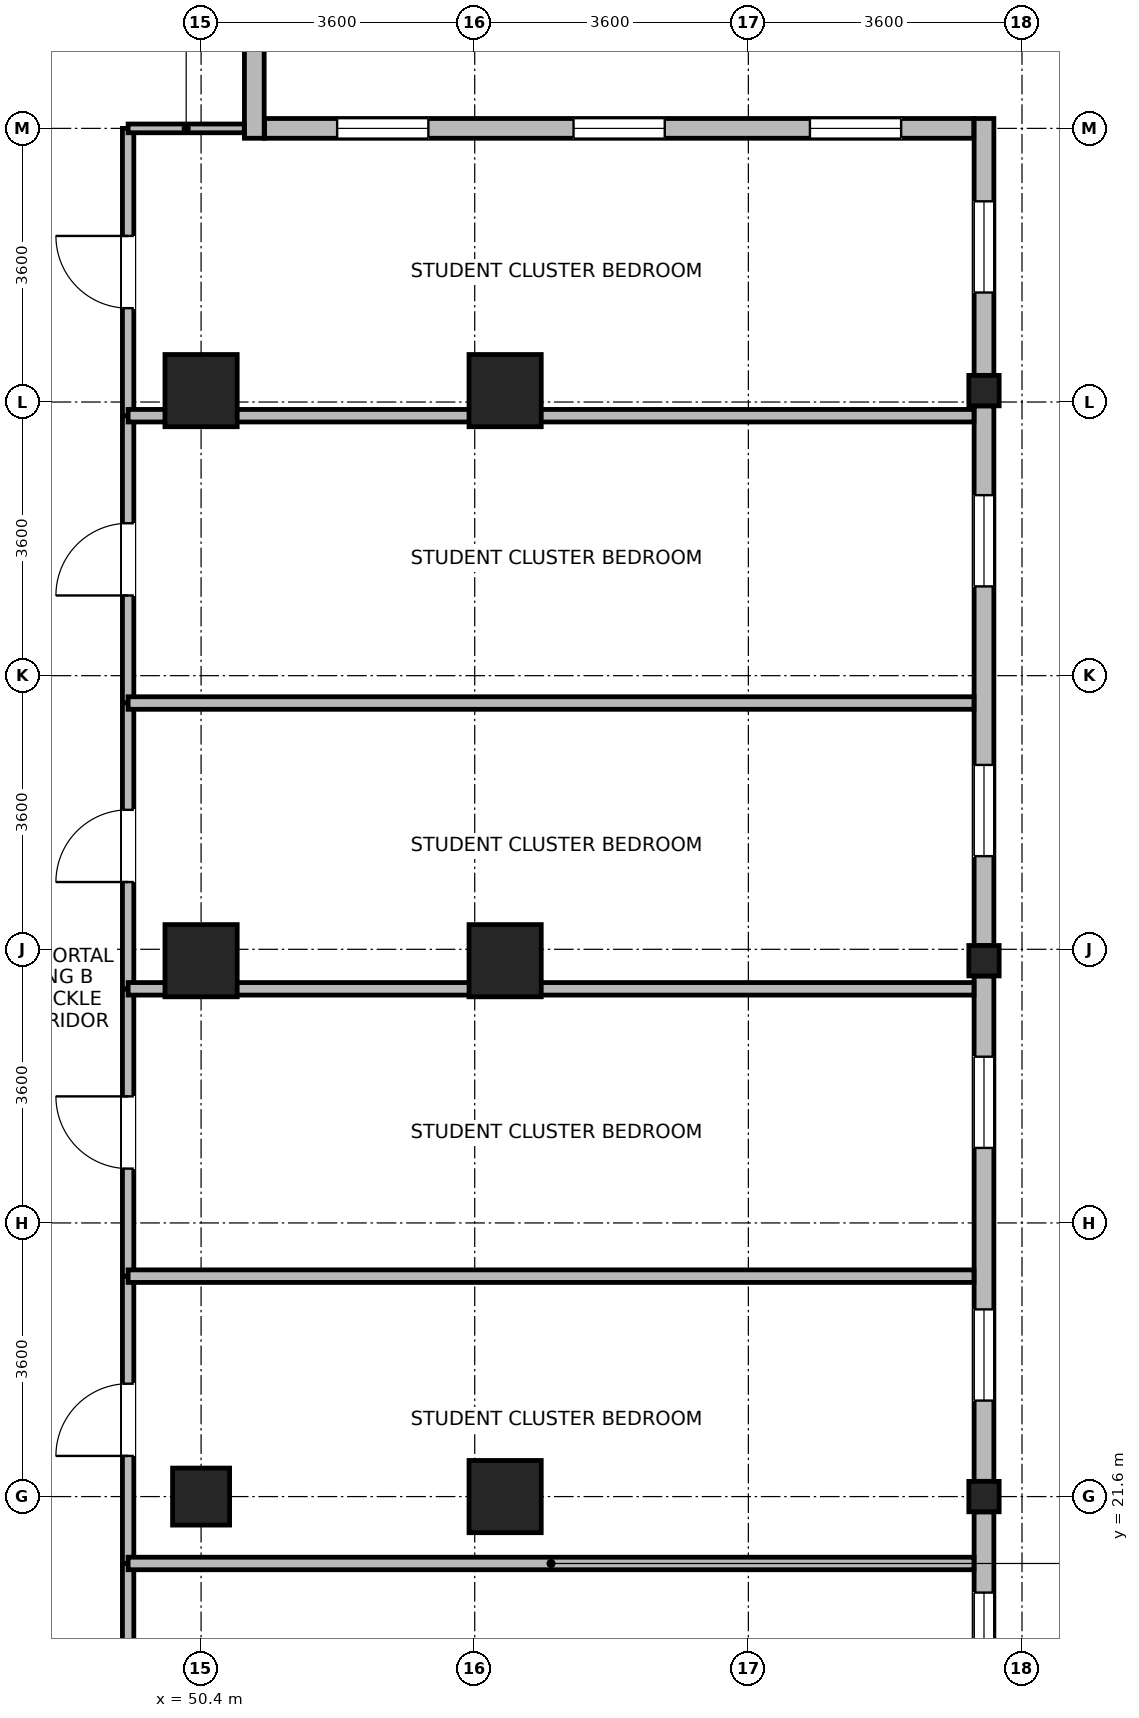
"""IFC4 building model, lengths in metres.
Left out: names, types, materials, properties, quantities, classifications, styles, units other than length and angle.
Written with IfcOpenShell. Run it as: python <this file> out.ifc"""

import sys

from ifc_helpers import new_model, si_unit, direction, frame, frame_2d, origin, origin_2d, place, context, subcontext, project, spatial, rectangle, i_section, extrude, source, transform, mapped, element, fill, save


model = new_model("IFC4")
c1 = context("Model", 3, precision=1e-05, world=origin(), true_north=direction((0.0, 1.0)))
c2 = subcontext(c1, "Body", "Model", "MODEL_VIEW")
j1 = project(units=[si_unit("LENGTHUNIT", "METRE"), si_unit("PLANEANGLEUNIT", "RADIAN")], contexts=[c1])
p1 = place(None, origin())
s1 = spatial("IfcSite", under=j1, at=p1, CompositionType="ELEMENT")
p2 = place(p1, origin())
s2 = spatial("IfcBuilding", under=s1, at=p2, CompositionType="ELEMENT")
p3 = place(p2, frame((0.0, 0.0, 246.2)))
s3 = spatial("IfcBuildingStorey", under=s2, at=p3, CompositionType="ELEMENT", Elevation=246.2)
m1 = source(origin(), c2, "Body", "SweptSolid", [
    extrude(rectangle(XDim=0.75, YDim=0.75, at=origin_2d()), origin(), (0.0, 0.0, 1.0), 3.7),
])
p4 = place(p3, frame((50.4, 21.6, 0.0), z_axis=(0.0, 0.0, 1.0), x_axis=(1.0, 0.0, 0.0)))
e1 = element("IfcColumn", 1, at=p4, inside=s3, PredefinedType="PILASTER", context=c2, shape_type="MappedRepresentation", body=[
    mapped(m1, transform((0.0, 0.0, 0.0), x_axis=(1.0, 0.0, 0.0), y_axis=(0.0, 1.0, 0.0), z_axis=(0.0, 0.0, 1.0), scale=1.0)),
])
m2 = source(origin(), c2, "Body", "SweptSolid", [
    extrude(rectangle(XDim=0.95, YDim=0.95, at=origin_2d()), origin(), (0.0, 0.0, 1.0), 3.7),
])
for number, where, z_axis, x_axis in (
    (2, (50.4, 28.65, 0.0), (0.0, 0.0, 1.0), (1.0, 0.0, 0.0)),
    (3, (50.4, 36.15, 0.0), (0.0, 0.0, 1.0), (1.0, 0.0, 0.0)),
    (4, (54.4, 21.6, 0.0), (0.0, 0.0, 1.0), (1.0, 0.0, 0.0)),
    (5, (54.4, 28.65, 0.0), (0.0, 0.0, 1.0), (1.0, 0.0, 0.0)),
    (6, (54.4, 36.15, 0.0), (0.0, 0.0, 1.0), (1.0, 0.0, 0.0)),
):
    element("IfcColumn", number, at=place(p3, frame(where, z_axis=z_axis, x_axis=x_axis)), inside=s3, PredefinedType="COLUMN", context=c2, shape_type="MappedRepresentation", body=[
        mapped(m2, transform((0.0, 0.0, 0.0), x_axis=(1.0, 0.0, 0.0), y_axis=(0.0, 1.0, 0.0), z_axis=(0.0, 0.0, 1.0), scale=1.0)),
    ])
m3 = source(origin(), c2, "Body", "SweptSolid", [
    extrude(i_section(OverallWidth=0.399, OverallDepth=0.4, WebThickness=0.017, FlangeThickness=0.023, FilletRadius=0.015, at=origin_2d()), origin(), (0.0, 0.0, 1.0), 3.7),
])
for number, where, z_axis, x_axis in (
    (7, (60.7, 21.6, 0.0), (0.0, 0.0, 1.0), (1.0, 0.0, 0.0)),
    (8, (60.7, 28.65, 0.0), (0.0, 0.0, 1.0), (1.0, 0.0, 0.0)),
    (9, (60.7, 36.15, 0.0), (0.0, 0.0, 1.0), (1.0, 0.0, 0.0)),
):
    element("IfcColumn", number, at=place(p3, frame(where, z_axis=z_axis, x_axis=x_axis)), inside=s3, PredefinedType="COLUMN", context=c2, shape_type="MappedRepresentation", body=[
        mapped(m3, transform((0.0, 0.0, 0.0), x_axis=(1.0, 0.0, 0.0), y_axis=(0.0, 1.0, 0.0), z_axis=(0.0, 0.0, 1.0), scale=1.0)),
    ])
p5 = place(p3, frame((60.7, 21.399, 0.0), z_axis=(0.0, 0.0, 1.0), x_axis=(0.0, -1.0, 0.0)))
e10 = element("IfcWall", 10, at=p5, inside=s3, PredefinedType="STANDARD", context=c2, shape_type="SweptSolid", body=[
    extrude(rectangle(XDim=6.648, YDim=0.26, at=frame_2d((3.324, 0.0))), origin(), (0.0, 0.0, 1.0), 2.86),
])
p6 = place(p5, frame((1.062, 0.0, 0.85)))
e11 = element("IfcOpeningElement", 11, at=p6, cuts=e10, PredefinedType="OPENING", context=c2, shape_type="SweptSolid", body=[
    extrude(rectangle(XDim=1.2, YDim=1.75, at=frame_2d((0.6, 0.875))), frame((0.0, 0.14, 0.0), z_axis=(0.0, -1.0, 0.0), x_axis=(1.0, 0.0, 0.0)), (0.0, 0.0, 1.0), 0.28),
])
p7 = place(p5, frame((2.849, 0.0, 0.85)))
e12 = element("IfcOpeningElement", 12, at=p7, cuts=e10, PredefinedType="OPENING", context=c2, shape_type="SweptSolid", body=[
    extrude(rectangle(XDim=0.95, YDim=1.75, at=frame_2d((0.475, 0.875))), frame((0.0, 0.14, 0.0), z_axis=(0.0, -1.0, 0.0), x_axis=(1.0, 0.0, 0.0)), (0.0, 0.0, 1.0), 0.28),
])
p8 = place(p3, frame((60.7, 28.449, 0.0), z_axis=(0.0, 0.0, 1.0), x_axis=(0.0, -1.0, 0.0)))
e13 = element("IfcWall", 13, at=p8, inside=s3, PredefinedType="STANDARD", context=c2, shape_type="SweptSolid", body=[
    extrude(rectangle(XDim=6.648, YDim=0.26, at=frame_2d((3.324, 0.0))), origin(), (0.0, 0.0, 1.0), 2.86),
])
p9 = place(p8, frame((1.062, 0.0, 0.85)))
e14 = element("IfcOpeningElement", 14, at=p9, cuts=e13, PredefinedType="OPENING", context=c2, shape_type="SweptSolid", body=[
    extrude(rectangle(XDim=1.2, YDim=1.75, at=frame_2d((0.6, 0.875))), frame((0.0, 0.14, 0.0), z_axis=(0.0, -1.0, 0.0), x_axis=(1.0, 0.0, 0.0)), (0.0, 0.0, 1.0), 0.28),
])
p10 = place(p8, frame((4.386, 0.0, 0.85)))
e15 = element("IfcOpeningElement", 15, at=p10, cuts=e13, PredefinedType="OPENING", context=c2, shape_type="SweptSolid", body=[
    extrude(rectangle(XDim=1.2, YDim=1.75, at=frame_2d((0.6, 0.875))), frame((0.0, 0.14, 0.0), z_axis=(0.0, -1.0, 0.0), x_axis=(1.0, 0.0, 0.0)), (0.0, 0.0, 1.0), 0.28),
])
p11 = place(p3, frame((60.7, 35.949, 0.0), z_axis=(0.0, 0.0, 1.0), x_axis=(0.0, -1.0, 0.0)))
e16 = element("IfcWall", 16, at=p11, inside=s3, PredefinedType="STANDARD", context=c2, shape_type="SweptSolid", body=[
    extrude(rectangle(XDim=7.098, YDim=0.26, at=frame_2d((3.549, 0.0))), origin(), (0.0, 0.0, 1.0), 2.86),
])
p12 = place(p11, frame((1.175, 0.0, 0.85)))
e17 = element("IfcOpeningElement", 17, at=p12, cuts=e16, PredefinedType="OPENING", context=c2, shape_type="SweptSolid", body=[
    extrude(rectangle(XDim=1.2, YDim=1.75, at=frame_2d((0.6, 0.875))), frame((0.0, 0.14, 0.0), z_axis=(0.0, -1.0, 0.0), x_axis=(1.0, 0.0, 0.0)), (0.0, 0.0, 1.0), 0.28),
])
p13 = place(p11, frame((4.723, 0.0, 0.85)))
e18 = element("IfcOpeningElement", 18, at=p13, cuts=e16, PredefinedType="OPENING", context=c2, shape_type="SweptSolid", body=[
    extrude(rectangle(XDim=1.2, YDim=1.75, at=frame_2d((0.6, 0.875))), frame((0.0, 0.14, 0.0), z_axis=(0.0, -1.0, 0.0), x_axis=(1.0, 0.0, 0.0)), (0.0, 0.0, 1.0), 0.28),
])
p14 = place(p3, frame((60.7, 39.73, 0.0), z_axis=(0.0, 0.0, 1.0), x_axis=(0.0, -1.0, 0.0)))
e19 = element("IfcWall", 19, at=p14, inside=s3, PredefinedType="STANDARD", context=c2, shape_type="SweptSolid", body=[
    extrude(rectangle(XDim=3.379, YDim=0.26, at=frame_2d((1.689, 0.0))), origin(), (0.0, 0.0, 1.0), 3.26),
])
p15 = place(p14, frame((1.09, 0.0, 0.85)))
e20 = element("IfcOpeningElement", 20, at=p15, cuts=e19, PredefinedType="OPENING", context=c2, shape_type="SweptSolid", body=[
    extrude(rectangle(XDim=1.2, YDim=1.75, at=frame_2d((0.6, 0.875))), frame((0.0, 0.14, 0.0), z_axis=(0.0, -1.0, 0.0), x_axis=(1.0, 0.0, 0.0)), (0.0, 0.0, 1.0), 0.28),
])
p16 = place(p3, frame((51.235, 39.6, 0.0), z_axis=(0.0, 0.0, 1.0), x_axis=(1.0, 0.0, 0.0)))
e21 = element("IfcWall", 21, at=p16, inside=s3, PredefinedType="STANDARD", context=c2, shape_type="SweptSolid", body=[
    extrude(rectangle(XDim=9.33, YDim=0.26, at=frame_2d((4.665, 0.0))), origin(), (0.0, 0.0, 1.0), 3.26),
])
p17 = place(p16, frame((0.955, 0.0, 0.85)))
e22 = element("IfcOpeningElement", 22, at=p17, cuts=e21, PredefinedType="OPENING", context=c2, shape_type="SweptSolid", body=[
    extrude(rectangle(XDim=1.2, YDim=1.75, at=frame_2d((0.6, 0.875))), frame((0.0, 0.14, 0.0), z_axis=(0.0, -1.0, 0.0), x_axis=(1.0, 0.0, 0.0)), (0.0, 0.0, 1.0), 0.28),
])
p18 = place(p16, frame((4.065, 0.0, 0.85)))
e23 = element("IfcOpeningElement", 23, at=p18, cuts=e21, PredefinedType="OPENING", context=c2, shape_type="SweptSolid", body=[
    extrude(rectangle(XDim=1.2, YDim=1.75, at=frame_2d((0.6, 0.875))), frame((0.0, 0.14, 0.0), z_axis=(0.0, -1.0, 0.0), x_axis=(1.0, 0.0, 0.0)), (0.0, 0.0, 1.0), 0.28),
])
p19 = place(p16, frame((7.175, 0.0, 0.85)))
e24 = element("IfcOpeningElement", 24, at=p19, cuts=e21, PredefinedType="OPENING", context=c2, shape_type="SweptSolid", body=[
    extrude(rectangle(XDim=1.2, YDim=1.75, at=frame_2d((0.6, 0.875))), frame((0.0, 0.14, 0.0), z_axis=(0.0, -1.0, 0.0), x_axis=(1.0, 0.0, 0.0)), (0.0, 0.0, 1.0), 0.28),
])
p20 = place(p3, frame((51.1, 43.33, 0.0), z_axis=(0.0, 0.0, 1.0), x_axis=(0.0, -1.0, 0.0)))
e25 = element("IfcWall", 25, at=p20, inside=s3, PredefinedType="STANDARD", context=c2, shape_type="SweptSolid", body=[
    extrude(rectangle(XDim=3.86, YDim=0.26, at=frame_2d((1.93, 0.0))), origin(), (0.0, 0.0, 1.0), 3.26),
])
p21 = place(p20, frame((1.33, 0.0, 0.85)))
e26 = element("IfcOpeningElement", 26, at=p21, cuts=e25, PredefinedType="OPENING", context=c2, shape_type="SweptSolid", body=[
    extrude(rectangle(XDim=1.2, YDim=1.75, at=frame_2d((0.6, 0.875))), frame((0.0, 0.14, 0.0), z_axis=(0.0, -1.0, 0.0), x_axis=(1.0, 0.0, 0.0)), (0.0, 0.0, 1.0), 0.28),
])
p22 = place(p3, frame((49.44, 20.72, 0.0), z_axis=(0.0, 0.0, 1.0), x_axis=(0.0, 1.0, 0.0)))
e27 = element("IfcWall", 27, at=p22, inside=s3, PredefinedType="PARTITIONING", context=c2, shape_type="SweptSolid", body=[
    extrude(rectangle(XDim=3.78, YDim=0.15, at=frame_2d((1.89, 0.0))), origin(), (0.0, 0.0, 1.0), 3.26),
])
p23 = place(p22, frame((1.415, 0.0, 0.0)))
e28 = element("IfcOpeningElement", 28, at=p23, cuts=e27, PredefinedType="OPENING", context=c2, shape_type="SweptSolid", body=[
    extrude(rectangle(XDim=0.95, YDim=2.1, at=frame_2d((0.475, 1.05))), frame((0.0, 0.085, 0.0), z_axis=(0.0, -1.0, 0.0), x_axis=(1.0, 0.0, 0.0)), (0.0, 0.0, 1.0), 0.17),
])
p24 = place(p3, frame((49.44, 24.5, 0.0), z_axis=(0.0, 0.0, 1.0), x_axis=(0.0, 1.0, 0.0)))
e29 = element("IfcWall", 29, at=p24, inside=s3, PredefinedType="PARTITIONING", context=c2, shape_type="SweptSolid", body=[
    extrude(rectangle(XDim=3.78, YDim=0.15, at=frame_2d((1.89, 0.0))), origin(), (0.0, 0.0, 1.0), 3.26),
])
p25 = place(p24, frame((1.415, 0.0, 0.0)))
e30 = element("IfcOpeningElement", 30, at=p25, cuts=e29, PredefinedType="OPENING", context=c2, shape_type="SweptSolid", body=[
    extrude(rectangle(XDim=0.95, YDim=2.1, at=frame_2d((0.475, 1.05))), frame((0.0, 0.085, 0.0), z_axis=(0.0, -1.0, 0.0), x_axis=(1.0, 0.0, 0.0)), (0.0, 0.0, 1.0), 0.17),
])
p26 = place(p3, frame((49.44, 32.04, 0.0), z_axis=(0.0, 0.0, 1.0), x_axis=(0.0, 1.0, 0.0)))
e31 = element("IfcWall", 31, at=p26, inside=s3, PredefinedType="PARTITIONING", context=c2, shape_type="SweptSolid", body=[
    extrude(rectangle(XDim=3.78, YDim=0.15, at=frame_2d((1.89, 0.0))), origin(), (0.0, 0.0, 1.0), 3.26),
])
p27 = place(p26, frame((1.415, 0.0, 0.0)))
e32 = element("IfcOpeningElement", 32, at=p27, cuts=e31, PredefinedType="OPENING", context=c2, shape_type="SweptSolid", body=[
    extrude(rectangle(XDim=0.95, YDim=2.1, at=frame_2d((0.475, 1.05))), frame((0.0, 0.085, 0.0), z_axis=(0.0, -1.0, 0.0), x_axis=(1.0, 0.0, 0.0)), (0.0, 0.0, 1.0), 0.17),
])
p28 = place(p3, frame((49.44, 35.82, 0.0), z_axis=(0.0, 0.0, 1.0), x_axis=(0.0, 1.0, 0.0)))
e33 = element("IfcWall", 33, at=p28, inside=s3, PredefinedType="PARTITIONING", context=c2, shape_type="SweptSolid", body=[
    extrude(rectangle(XDim=3.78, YDim=0.15, at=frame_2d((1.89, 0.0))), origin(), (0.0, 0.0, 1.0), 3.26),
])
p29 = place(p28, frame((1.415, 0.0, 0.0)))
e34 = element("IfcOpeningElement", 34, at=p29, cuts=e33, PredefinedType="OPENING", context=c2, shape_type="SweptSolid", body=[
    extrude(rectangle(XDim=0.95, YDim=2.1, at=frame_2d((0.475, 1.05))), frame((0.0, 0.085, 0.0), z_axis=(0.0, -1.0, 0.0), x_axis=(1.0, 0.0, 0.0)), (0.0, 0.0, 1.0), 0.17),
])
p30 = place(p3, frame((49.44, 16.96, 0.0), z_axis=(0.0, 0.0, 1.0), x_axis=(0.0, 1.0, 0.0)))
e35 = element("IfcWall", 35, at=p30, inside=s3, PredefinedType="PARTITIONING", context=c2, shape_type="SweptSolid", body=[
    extrude(rectangle(XDim=3.76, YDim=0.15, at=frame_2d((1.88, 0.0))), origin(), (0.0, 0.0, 1.0), 3.26),
])
p31 = place(p3, frame((49.44, 28.28, 0.0), z_axis=(0.0, 0.0, 1.0), x_axis=(0.0, 1.0, 0.0)))
e36 = element("IfcWall", 36, at=p31, inside=s3, PredefinedType="PARTITIONING", context=c2, shape_type="SweptSolid", body=[
    extrude(rectangle(XDim=3.76, YDim=0.15, at=frame_2d((1.88, 0.0))), origin(), (0.0, 0.0, 1.0), 3.26),
])
p32 = place(p31, frame((1.405, 0.0, 0.0)))
e37 = element("IfcOpeningElement", 37, at=p32, cuts=e36, PredefinedType="OPENING", context=c2, shape_type="SweptSolid", body=[
    extrude(rectangle(XDim=0.95, YDim=2.1, at=frame_2d((0.475, 1.05))), frame((0.0, 0.085, 0.0), z_axis=(0.0, -1.0, 0.0), x_axis=(1.0, 0.0, 0.0)), (0.0, 0.0, 1.0), 0.17),
])
for number, where, z_axis, x_axis in (
    (38, (49.44, 20.72, 0.0), (0.0, 0.0, 1.0), (1.0, 0.0, 0.0)),
    (39, (49.44, 24.5, 0.0), (0.0, 0.0, 1.0), (1.0, 0.0, 0.0)),
    (40, (49.44, 28.28, 0.0), (0.0, 0.0, 1.0), (1.0, 0.0, 0.0)),
    (41, (49.44, 32.04, 0.0), (0.0, 0.0, 1.0), (1.0, 0.0, 0.0)),
    (42, (49.44, 35.82, 0.0), (0.0, 0.0, 1.0), (1.0, 0.0, 0.0)),
):
    element("IfcWall", number, at=place(p3, frame(where, z_axis=z_axis, x_axis=x_axis)), inside=s3, PredefinedType="PARTITIONING", context=c2, shape_type="SweptSolid", body=[
        extrude(rectangle(XDim=11.128, YDim=0.165, at=frame_2d((5.564, 0.0))), origin(), (0.0, 0.0, 1.0), 3.26),
    ])
p33 = place(p3, frame((49.44, 39.6, 0.0), z_axis=(0.0, 0.0, 1.0), x_axis=(1.0, 0.0, 0.0)))
e43 = element("IfcWall", 43, at=p33, inside=s3, PredefinedType="PARTITIONING", context=c2, shape_type="SweptSolid", body=[
    extrude(rectangle(XDim=1.528, YDim=0.115, at=frame_2d((0.764, 0.0))), origin(), (0.0, 0.0, 1.0), 3.26),
])
p34 = place(p6, origin())
e44 = element("IfcWindow", 44, at=p34, inside=s3, PartitioningType="SINGLE_PANEL", PredefinedType="WINDOW", context=c2, shape_type="SweptSolid", body=[
    extrude(rectangle(XDim=1.2, YDim=1.75, at=frame_2d((0.6, 0.875))), frame((0.0, 0.03, 0.0), z_axis=(0.0, -1.0, 0.0), x_axis=(1.0, 0.0, 0.0)), (0.0, 0.0, 1.0), 0.06),
])
fill(e11, e44)
p35 = place(p9, origin())
e45 = element("IfcWindow", 45, at=p35, inside=s3, PartitioningType="SINGLE_PANEL", PredefinedType="WINDOW", context=c2, shape_type="SweptSolid", body=[
    extrude(rectangle(XDim=1.2, YDim=1.75, at=frame_2d((0.6, 0.875))), frame((0.0, 0.03, 0.0), z_axis=(0.0, -1.0, 0.0), x_axis=(1.0, 0.0, 0.0)), (0.0, 0.0, 1.0), 0.06),
])
fill(e14, e45)
p36 = place(p10, origin())
e46 = element("IfcWindow", 46, at=p36, inside=s3, PartitioningType="SINGLE_PANEL", PredefinedType="WINDOW", context=c2, shape_type="SweptSolid", body=[
    extrude(rectangle(XDim=1.2, YDim=1.75, at=frame_2d((0.6, 0.875))), frame((0.0, 0.03, 0.0), z_axis=(0.0, -1.0, 0.0), x_axis=(1.0, 0.0, 0.0)), (0.0, 0.0, 1.0), 0.06),
])
fill(e15, e46)
p37 = place(p12, origin())
e47 = element("IfcWindow", 47, at=p37, inside=s3, PartitioningType="SINGLE_PANEL", PredefinedType="WINDOW", context=c2, shape_type="SweptSolid", body=[
    extrude(rectangle(XDim=1.2, YDim=1.75, at=frame_2d((0.6, 0.875))), frame((0.0, 0.03, 0.0), z_axis=(0.0, -1.0, 0.0), x_axis=(1.0, 0.0, 0.0)), (0.0, 0.0, 1.0), 0.06),
])
fill(e17, e47)
p38 = place(p13, origin())
e48 = element("IfcWindow", 48, at=p38, inside=s3, PartitioningType="SINGLE_PANEL", PredefinedType="WINDOW", context=c2, shape_type="SweptSolid", body=[
    extrude(rectangle(XDim=1.2, YDim=1.75, at=frame_2d((0.6, 0.875))), frame((0.0, 0.03, 0.0), z_axis=(0.0, -1.0, 0.0), x_axis=(1.0, 0.0, 0.0)), (0.0, 0.0, 1.0), 0.06),
])
fill(e18, e48)
p39 = place(p15, origin())
e49 = element("IfcWindow", 49, at=p39, inside=s3, PartitioningType="SINGLE_PANEL", PredefinedType="WINDOW", context=c2, shape_type="SweptSolid", body=[
    extrude(rectangle(XDim=1.2, YDim=1.75, at=frame_2d((0.6, 0.875))), frame((0.0, 0.03, 0.0), z_axis=(0.0, -1.0, 0.0), x_axis=(1.0, 0.0, 0.0)), (0.0, 0.0, 1.0), 0.06),
])
fill(e20, e49)
p40 = place(p17, origin())
e50 = element("IfcWindow", 50, at=p40, inside=s3, PartitioningType="SINGLE_PANEL", PredefinedType="WINDOW", context=c2, shape_type="SweptSolid", body=[
    extrude(rectangle(XDim=1.2, YDim=1.75, at=frame_2d((0.6, 0.875))), frame((0.0, 0.03, 0.0), z_axis=(0.0, -1.0, 0.0), x_axis=(1.0, 0.0, 0.0)), (0.0, 0.0, 1.0), 0.06),
])
fill(e22, e50)
p41 = place(p18, origin())
e51 = element("IfcWindow", 51, at=p41, inside=s3, PartitioningType="SINGLE_PANEL", PredefinedType="WINDOW", context=c2, shape_type="SweptSolid", body=[
    extrude(rectangle(XDim=1.2, YDim=1.75, at=frame_2d((0.6, 0.875))), frame((0.0, 0.03, 0.0), z_axis=(0.0, -1.0, 0.0), x_axis=(1.0, 0.0, 0.0)), (0.0, 0.0, 1.0), 0.06),
])
fill(e23, e51)
p42 = place(p19, origin())
e52 = element("IfcWindow", 52, at=p42, inside=s3, PartitioningType="SINGLE_PANEL", PredefinedType="WINDOW", context=c2, shape_type="SweptSolid", body=[
    extrude(rectangle(XDim=1.2, YDim=1.75, at=frame_2d((0.6, 0.875))), frame((0.0, 0.03, 0.0), z_axis=(0.0, -1.0, 0.0), x_axis=(1.0, 0.0, 0.0)), (0.0, 0.0, 1.0), 0.06),
])
fill(e24, e52)
p43 = place(p23, origin())
e53 = element("IfcDoor", 53, at=p43, inside=s3, OperationType="SINGLE_SWING_LEFT", PredefinedType="DOOR", context=c2, shape_type="SweptSolid", body=[
    extrude(rectangle(XDim=0.95, YDim=2.1, at=frame_2d((0.475, 1.05))), frame((0.0, 0.025, 0.0), z_axis=(0.0, -1.0, 0.0), x_axis=(1.0, 0.0, 0.0)), (0.0, 0.0, 1.0), 0.05),
])
fill(e28, e53)
p44 = place(p25, origin())
e54 = element("IfcDoor", 54, at=p44, inside=s3, OperationType="SINGLE_SWING_RIGHT", PredefinedType="DOOR", context=c2, shape_type="SweptSolid", body=[
    extrude(rectangle(XDim=0.95, YDim=2.1, at=frame_2d((0.475, 1.05))), frame((0.0, 0.025, 0.0), z_axis=(0.0, -1.0, 0.0), x_axis=(1.0, 0.0, 0.0)), (0.0, 0.0, 1.0), 0.05),
])
fill(e30, e54)
p45 = place(p27, origin())
e55 = element("IfcDoor", 55, at=p45, inside=s3, OperationType="SINGLE_SWING_LEFT", PredefinedType="DOOR", context=c2, shape_type="SweptSolid", body=[
    extrude(rectangle(XDim=0.95, YDim=2.1, at=frame_2d((0.475, 1.05))), frame((0.0, 0.025, 0.0), z_axis=(0.0, -1.0, 0.0), x_axis=(1.0, 0.0, 0.0)), (0.0, 0.0, 1.0), 0.05),
])
fill(e32, e55)
p46 = place(p29, origin())
e56 = element("IfcDoor", 56, at=p46, inside=s3, OperationType="SINGLE_SWING_RIGHT", PredefinedType="DOOR", context=c2, shape_type="SweptSolid", body=[
    extrude(rectangle(XDim=0.95, YDim=2.1, at=frame_2d((0.475, 1.05))), frame((0.0, 0.025, 0.0), z_axis=(0.0, -1.0, 0.0), x_axis=(1.0, 0.0, 0.0)), (0.0, 0.0, 1.0), 0.05),
])
fill(e34, e56)
p47 = place(p32, origin())
e57 = element("IfcDoor", 57, at=p47, inside=s3, OperationType="SINGLE_SWING_LEFT", PredefinedType="DOOR", context=c2, shape_type="SweptSolid", body=[
    extrude(rectangle(XDim=0.95, YDim=2.1, at=frame_2d((0.475, 1.05))), frame((0.0, 0.025, 0.0), z_axis=(0.0, -1.0, 0.0), x_axis=(1.0, 0.0, 0.0)), (0.0, 0.0, 1.0), 0.05),
])
fill(e37, e57)
save(model, sys.argv[1])
